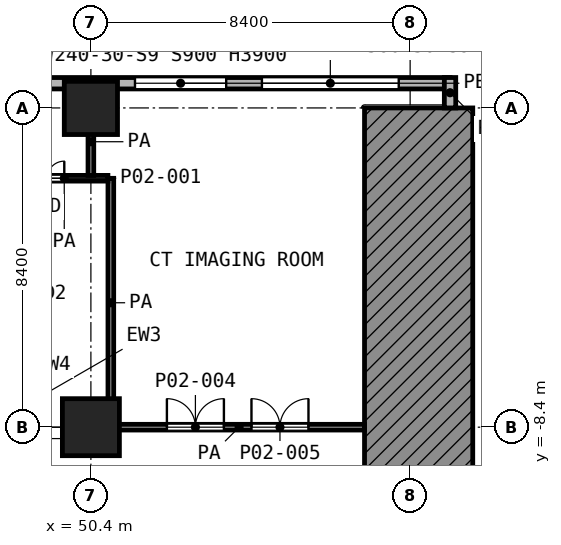
"""IFC4 building model, lengths in metres.
Left out: names, types, materials, properties, quantities, classifications, styles, units other than length and angle.
Written with IfcOpenShell. Run it as: python <this file> out.ifc"""

import sys

from ifc_helpers import new_model, si_unit, direction, frame, frame_2d, origin, origin_2d, place, context, subcontext, project, spatial, polyline, rectangle, outline, extrude, element, fill, save


model = new_model("IFC4")
c1 = context("Model", 3, precision=1e-05, world=origin(), true_north=direction((0.0, 1.0)))
c2 = subcontext(c1, "Body", "Model", "MODEL_VIEW")
j1 = project(units=[si_unit("LENGTHUNIT", "METRE"), si_unit("PLANEANGLEUNIT", "RADIAN")], contexts=[c1])
p1 = place(None, origin())
s1 = spatial("IfcSite", under=j1, at=p1, CompositionType="ELEMENT")
p2 = place(p1, origin())
s2 = spatial("IfcBuilding", under=s1, at=p2, CompositionType="ELEMENT")
p3 = place(p2, frame((0.0, 0.0, 7.0)))
s3 = spatial("IfcBuildingStorey", under=s2, at=p3, CompositionType="ELEMENT", Elevation=7.0)
p4 = place(p3, frame((50.4, 0.0, 0.0), z_axis=(0.0, 0.0, 1.0), x_axis=(1.0, 0.0, 0.0)))
e1 = element("IfcColumn", 1, at=p4, inside=s3, PredefinedType="COLUMN", context=c2, shape_type="SweptSolid", body=[
    extrude(rectangle(XDim=1.4, YDim=1.4, at=origin_2d()), origin(), (0.0, 0.0, 1.0), 5.6),
])
p5 = place(p3, frame((50.4, -8.4, 0.0), z_axis=(0.0, 0.0, 1.0), x_axis=(1.0, 0.0, 0.0)))
e2 = element("IfcColumn", 2, at=p5, inside=s3, PredefinedType="COLUMN", context=c2, shape_type="SweptSolid", body=[
    extrude(rectangle(XDim=1.5, YDim=1.5, at=origin_2d()), origin(), (0.0, 0.0, 1.0), 5.6),
])
p6 = place(p3, frame((0.0, 0.0, -7.0), z_axis=(0.0, -1.0, 0.0), x_axis=(1.0, 0.0, 0.0)))
e3 = element("IfcWall", 3, at=p6, inside=s3, PredefinedType="SHEAR", context=c2, shape_type="SweptSolid", body=[
    extrude(outline(polyline([(60.448, 12.6), (60.159, 11.256), (60.0, 9.0), (60.0, 7.0), (57.6, 7.0), (57.6, 12.6), (60.448, 12.6)])), origin(), (0.0, 0.0, 1.0), 33.6),
])
p7 = place(p3, frame((59.85, 0.0, 0.0), z_axis=(0.0, 0.0, 1.0), x_axis=(0.0, 1.0, 0.0)))
e4 = element("IfcWall", 4, at=p7, inside=s3, PredefinedType="SOLIDWALL", context=c2, shape_type="SweptSolid", body=[
    extrude(rectangle(XDim=0.8, YDim=0.3, at=frame_2d((0.4, 0.0))), origin(), (0.0, 0.0, 1.0), 5.25),
])
p8 = place(p3, frame((59.85, 0.65, 0.0), z_axis=(0.0, 0.0, 1.0), x_axis=(-1.0, 0.0, 0.0)))
e5 = element("IfcWall", 5, at=p8, inside=s3, PredefinedType="SOLIDWALL", context=c2, shape_type="SweptSolid", body=[
    extrude(rectangle(XDim=54.588, YDim=0.3, at=frame_2d((27.294, 0.0))), origin(), (0.0, 0.0, 1.0), 5.25),
])
p9 = place(p8, frame((1.35, 0.0, 0.9)))
e6 = element("IfcOpeningElement", 6, at=p9, cuts=e5, PredefinedType="OPENING", context=c2, shape_type="SweptSolid", body=[
    extrude(rectangle(XDim=3.6, YDim=3.0, at=frame_2d((1.8, 1.5))), frame((0.0, 0.16, 0.0), z_axis=(0.0, -1.0, 0.0), x_axis=(1.0, 0.0, 0.0)), (0.0, 0.0, 1.0), 0.32),
])
p10 = place(p8, frame((5.89, 0.0, 0.9)))
e7 = element("IfcOpeningElement", 7, at=p10, cuts=e5, PredefinedType="OPENING", context=c2, shape_type="SweptSolid", body=[
    extrude(rectangle(XDim=2.4, YDim=3.0, at=frame_2d((1.2, 1.5))), frame((0.0, 0.16, 0.0), z_axis=(0.0, -1.0, 0.0), x_axis=(1.0, 0.0, 0.0)), (0.0, 0.0, 1.0), 0.32),
])
p11 = place(p8, frame((10.61, 0.0, 0.9)))
e8 = element("IfcOpeningElement", 8, at=p11, cuts=e5, PredefinedType="OPENING", context=c2, shape_type="SweptSolid", body=[
    extrude(rectangle(XDim=2.4, YDim=3.0, at=frame_2d((1.2, 1.5))), frame((0.0, 0.16, 0.0), z_axis=(0.0, -1.0, 0.0), x_axis=(1.0, 0.0, 0.0)), (0.0, 0.0, 1.0), 0.32),
])
p12 = place(p8, frame((14.275, 0.0, 0.9)))
e9 = element("IfcOpeningElement", 9, at=p12, cuts=e5, PredefinedType="OPENING", context=c2, shape_type="SweptSolid", body=[
    extrude(rectangle(XDim=2.4, YDim=3.0, at=frame_2d((1.2, 1.5))), frame((0.0, 0.16, 0.0), z_axis=(0.0, -1.0, 0.0), x_axis=(1.0, 0.0, 0.0)), (0.0, 0.0, 1.0), 0.32),
])
p13 = place(p8, frame((20.271, 0.0, 0.9)))
e10 = element("IfcOpeningElement", 10, at=p13, cuts=e5, PredefinedType="OPENING", context=c2, shape_type="SweptSolid", body=[
    extrude(rectangle(XDim=1.2, YDim=3.0, at=frame_2d((0.6, 1.5))), frame((0.0, 0.16, 0.0), z_axis=(0.0, -1.0, 0.0), x_axis=(1.0, 0.0, 0.0)), (0.0, 0.0, 1.0), 0.32),
])
p14 = place(p8, frame((22.69, 0.0, 0.9)))
e11 = element("IfcOpeningElement", 11, at=p14, cuts=e5, PredefinedType="OPENING", context=c2, shape_type="SweptSolid", body=[
    extrude(rectangle(XDim=2.4, YDim=3.0, at=frame_2d((1.2, 1.5))), frame((0.0, 0.16, 0.0), z_axis=(0.0, -1.0, 0.0), x_axis=(1.0, 0.0, 0.0)), (0.0, 0.0, 1.0), 0.32),
])
p15 = place(p8, frame((27.325, 0.0, 0.9)))
e12 = element("IfcOpeningElement", 12, at=p15, cuts=e5, PredefinedType="OPENING", context=c2, shape_type="SweptSolid", body=[
    extrude(rectangle(XDim=2.4, YDim=3.0, at=frame_2d((1.2, 1.5))), frame((0.0, 0.16, 0.0), z_axis=(0.0, -1.0, 0.0), x_axis=(1.0, 0.0, 0.0)), (0.0, 0.0, 1.0), 0.32),
])
p16 = place(p8, frame((31.09, 0.0, 0.9)))
e13 = element("IfcOpeningElement", 13, at=p16, cuts=e5, PredefinedType="OPENING", context=c2, shape_type="SweptSolid", body=[
    extrude(rectangle(XDim=2.4, YDim=3.0, at=frame_2d((1.2, 1.5))), frame((0.0, 0.16, 0.0), z_axis=(0.0, -1.0, 0.0), x_axis=(1.0, 0.0, 0.0)), (0.0, 0.0, 1.0), 0.32),
])
p17 = place(p8, frame((35.81, 0.0, 0.9)))
e14 = element("IfcOpeningElement", 14, at=p17, cuts=e5, PredefinedType="OPENING", context=c2, shape_type="SweptSolid", body=[
    extrude(rectangle(XDim=2.4, YDim=3.0, at=frame_2d((1.2, 1.5))), frame((0.0, 0.16, 0.0), z_axis=(0.0, -1.0, 0.0), x_axis=(1.0, 0.0, 0.0)), (0.0, 0.0, 1.0), 0.32),
])
p18 = place(p8, frame((39.49, 0.0, 0.9)))
e15 = element("IfcOpeningElement", 15, at=p18, cuts=e5, PredefinedType="OPENING", context=c2, shape_type="SweptSolid", body=[
    extrude(rectangle(XDim=2.4, YDim=3.0, at=frame_2d((1.2, 1.5))), frame((0.0, 0.16, 0.0), z_axis=(0.0, -1.0, 0.0), x_axis=(1.0, 0.0, 0.0)), (0.0, 0.0, 1.0), 0.32),
])
p19 = place(p8, frame((44.21, 0.0, 0.9)))
e16 = element("IfcOpeningElement", 16, at=p19, cuts=e5, PredefinedType="OPENING", context=c2, shape_type="SweptSolid", body=[
    extrude(rectangle(XDim=2.4, YDim=3.0, at=frame_2d((1.2, 1.5))), frame((0.0, 0.16, 0.0), z_axis=(0.0, -1.0, 0.0), x_axis=(1.0, 0.0, 0.0)), (0.0, 0.0, 1.0), 0.32),
])
p20 = place(p8, frame((47.55, 0.0, 0.9)))
e17 = element("IfcOpeningElement", 17, at=p20, cuts=e5, PredefinedType="OPENING", context=c2, shape_type="SweptSolid", body=[
    extrude(rectangle(XDim=3.6, YDim=3.0, at=frame_2d((1.8, 1.5))), frame((0.0, 0.16, 0.0), z_axis=(0.0, -1.0, 0.0), x_axis=(1.0, 0.0, 0.0)), (0.0, 0.0, 1.0), 0.32),
])
p21 = place(p8, frame((51.778, 0.0, 0.9)))
e18 = element("IfcOpeningElement", 18, at=p21, cuts=e5, PredefinedType="OPENING", context=c2, shape_type="SweptSolid", body=[
    extrude(rectangle(XDim=1.2, YDim=3.0, at=frame_2d((0.6, 1.5))), frame((0.0, 0.16, 0.0), z_axis=(0.0, -1.0, 0.0), x_axis=(1.0, 0.0, 0.0)), (0.0, 0.0, 1.0), 0.32),
])
p22 = place(p3, frame((51.0, -8.4, 0.0), z_axis=(0.0, 0.0, 1.0), x_axis=(1.0, 0.0, 0.0)))
e19 = element("IfcWall", 19, at=p22, inside=s3, PredefinedType="PARTITIONING", context=c2, shape_type="SweptSolid", body=[
    extrude(rectangle(XDim=6.6, YDim=0.15, at=frame_2d((3.3, 0.0))), origin(), (0.0, 0.0, 1.0), 5.25),
])
p23 = place(p22, frame((1.4, 0.0, 0.0)))
e20 = element("IfcOpeningElement", 20, at=p23, cuts=e19, PredefinedType="OPENING", context=c2, shape_type="SweptSolid", body=[
    extrude(rectangle(XDim=1.5, YDim=2.1, at=frame_2d((0.75, 1.05))), frame((0.0, 0.085, 0.0), z_axis=(0.0, -1.0, 0.0), x_axis=(1.0, 0.0, 0.0)), (0.0, 0.0, 1.0), 0.17),
])
p24 = place(p22, frame((3.625, 0.0, 0.0)))
e21 = element("IfcOpeningElement", 21, at=p24, cuts=e19, PredefinedType="OPENING", context=c2, shape_type="SweptSolid", body=[
    extrude(rectangle(XDim=1.5, YDim=2.1, at=frame_2d((0.75, 1.05))), frame((0.0, 0.085, 0.0), z_axis=(0.0, -1.0, 0.0), x_axis=(1.0, 0.0, 0.0)), (0.0, 0.0, 1.0), 0.17),
])
p25 = place(p3, frame((48.55, -1.85, 0.0), z_axis=(0.0, 0.0, 1.0), x_axis=(1.0, 0.0, 0.0)))
e22 = element("IfcWall", 22, at=p25, inside=s3, PredefinedType="PARTITIONING", context=c2, shape_type="SweptSolid", body=[
    extrude(rectangle(XDim=2.298, YDim=0.15, at=frame_2d((1.149, 0.0))), origin(), (0.0, 0.0, 1.0), 5.25),
])
p26 = place(p25, frame((0.25, 0.0, 0.0)))
e23 = element("IfcOpeningElement", 23, at=p26, cuts=e22, PredefinedType="OPENING", context=c2, shape_type="SweptSolid", body=[
    extrude(rectangle(XDim=0.9, YDim=2.1, at=frame_2d((0.45, 1.05))), frame((0.0, 0.085, 0.0), z_axis=(0.0, -1.0, 0.0), x_axis=(1.0, 0.0, 0.0)), (0.0, 0.0, 1.0), 0.17),
])
p27 = place(p3, frame((50.4, -1.775, 0.0), z_axis=(0.0, 0.0, 1.0), x_axis=(0.0, 1.0, 0.0)))
e24 = element("IfcWall", 24, at=p27, inside=s3, PredefinedType="PARTITIONING", context=c2, shape_type="SweptSolid", body=[
    extrude(rectangle(XDim=1.772, YDim=0.15, at=frame_2d((0.886, 0.0))), origin(), (0.0, 0.0, 1.0), 5.25),
])
p28 = place(p3, frame((50.925, -8.4, 0.0), z_axis=(0.0, 0.0, 1.0), x_axis=(0.0, 1.0, 0.0)))
e25 = element("IfcWall", 25, at=p28, inside=s3, PredefinedType="PARTITIONING", context=c2, shape_type="SweptSolid", body=[
    extrude(rectangle(XDim=6.548, YDim=0.15, at=frame_2d((3.274, 0.0))), origin(), (0.0, 0.0, 1.0), 5.25),
])
p29 = place(p9, origin())
e26 = element("IfcWindow", 26, at=p29, inside=s3, PartitioningType="SINGLE_PANEL", PredefinedType="WINDOW", context=c2, shape_type="SweptSolid", body=[
    extrude(rectangle(XDim=3.6, YDim=3.0, at=frame_2d((1.8, 1.5))), frame((0.0, 0.03, 0.0), z_axis=(0.0, -1.0, 0.0), x_axis=(1.0, 0.0, 0.0)), (0.0, 0.0, 1.0), 0.06),
])
fill(e6, e26)
p30 = place(p10, origin())
e27 = element("IfcWindow", 27, at=p30, inside=s3, PartitioningType="SINGLE_PANEL", PredefinedType="WINDOW", context=c2, shape_type="SweptSolid", body=[
    extrude(rectangle(XDim=2.4, YDim=3.0, at=frame_2d((1.2, 1.5))), frame((0.0, 0.03, 0.0), z_axis=(0.0, -1.0, 0.0), x_axis=(1.0, 0.0, 0.0)), (0.0, 0.0, 1.0), 0.06),
])
fill(e7, e27)
p31 = place(p26, origin())
e28 = element("IfcDoor", 28, at=p31, inside=s3, OperationType="DOUBLE_DOOR_SINGLE_SWING", PredefinedType="DOOR", context=c2, shape_type="SweptSolid", body=[
    extrude(rectangle(XDim=0.9, YDim=2.1, at=frame_2d((0.45, 1.05))), frame((0.0, 0.025, 0.0), z_axis=(0.0, -1.0, 0.0), x_axis=(1.0, 0.0, 0.0)), (0.0, 0.0, 1.0), 0.05),
])
fill(e23, e28)
p32 = place(p23, origin())
e29 = element("IfcDoor", 29, at=p32, inside=s3, OperationType="DOUBLE_DOOR_SINGLE_SWING", PredefinedType="DOOR", context=c2, shape_type="SweptSolid", body=[
    extrude(rectangle(XDim=1.5, YDim=2.1, at=frame_2d((0.75, 1.05))), frame((0.0, 0.025, 0.0), z_axis=(0.0, -1.0, 0.0), x_axis=(1.0, 0.0, 0.0)), (0.0, 0.0, 1.0), 0.05),
])
fill(e20, e29)
p33 = place(p24, origin())
e30 = element("IfcDoor", 30, at=p33, inside=s3, OperationType="DOUBLE_DOOR_SINGLE_SWING", PredefinedType="DOOR", context=c2, shape_type="SweptSolid", body=[
    extrude(rectangle(XDim=1.5, YDim=2.1, at=frame_2d((0.75, 1.05))), frame((0.0, 0.025, 0.0), z_axis=(0.0, -1.0, 0.0), x_axis=(1.0, 0.0, 0.0)), (0.0, 0.0, 1.0), 0.05),
])
fill(e21, e30)
save(model, sys.argv[1])
